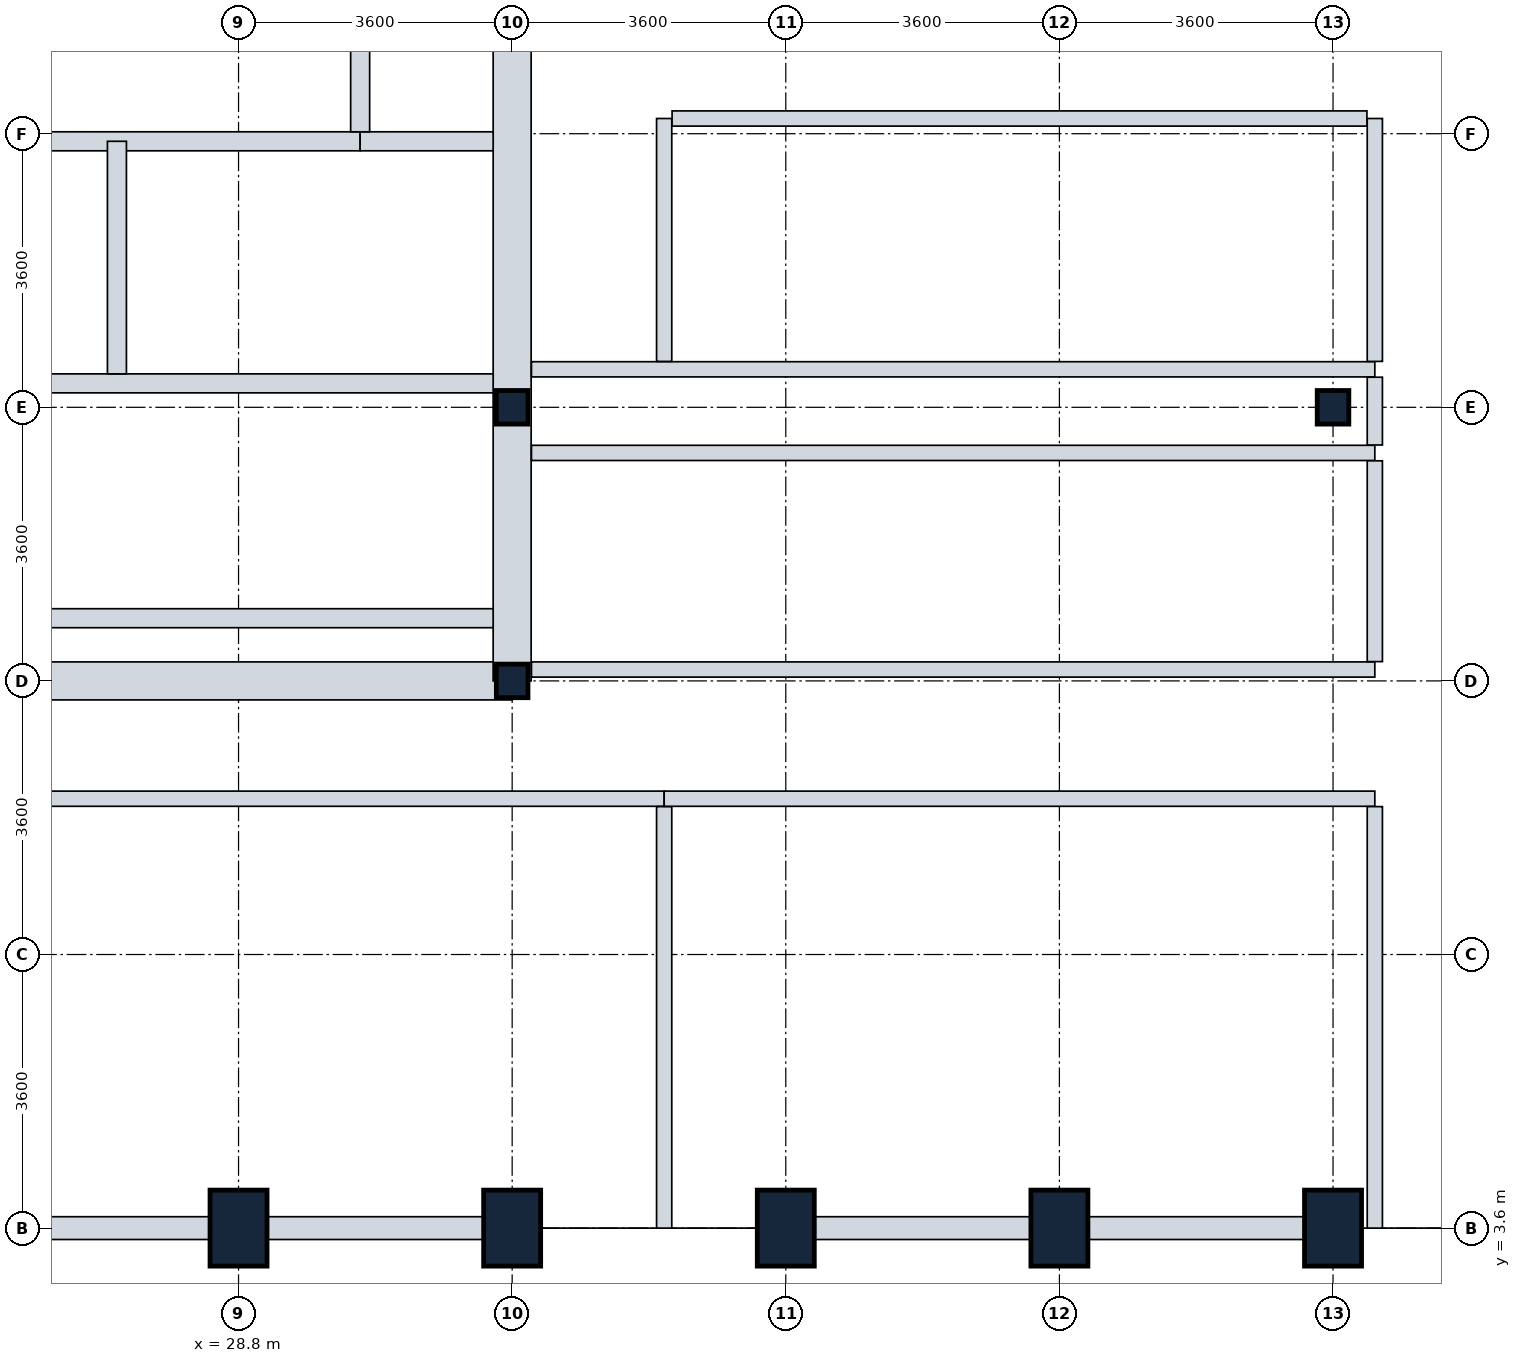
"""IFC4 building model, lengths in metres.
Left out: names, types, materials, properties, quantities, classifications, styles, units other than length and angle.
Written with IfcOpenShell. Run it as: python <this file> out.ifc"""

import sys

from ifc_helpers import new_model, si_unit, direction, frame, frame_2d, origin, origin_2d, place, context, subcontext, project, spatial, rectangle, i_section, extrude, element, fill, save


model = new_model("IFC4")
c1 = context("Model", 3, precision=1e-05, world=origin(), true_north=direction((0.0, 1.0)))
c2 = subcontext(c1, "Body", "Model", "MODEL_VIEW")
j1 = project(units=[si_unit("LENGTHUNIT", "METRE"), si_unit("PLANEANGLEUNIT", "RADIAN")], contexts=[c1])
p1 = place(None, origin())
s1 = spatial("IfcSite", under=j1, at=p1, CompositionType="ELEMENT")
p2 = place(p1, origin())
s2 = spatial("IfcBuilding", under=s1, at=p2, CompositionType="ELEMENT")
p3 = place(p2, frame((0.0, 0.0, 169.4)))
s3 = spatial("IfcBuildingStorey", under=s2, at=p3, CompositionType="ELEMENT", Elevation=169.4)
for number, where, z_axis, x_axis in (
    (1, (28.8, 3.6, 0.0), (0.0, 0.0, 1.0), (1.0, 0.0, 0.0)),
    (2, (32.4, 3.6, 0.0), (0.0, 0.0, 1.0), (1.0, 0.0, 0.0)),
):
    element("IfcColumn", number, at=place(p3, frame(where, z_axis=z_axis, x_axis=x_axis)), inside=s3, PredefinedType="COLUMN", context=c2, shape_type="SweptSolid", body=[
        extrude(rectangle(XDim=0.75, YDim=1.0, at=origin_2d()), origin(), (0.0, 0.0, 1.0), 5.4),
    ])
for number, where, z_axis, x_axis in (
    (3, (32.4, 10.8, 0.0), (0.0, 0.0, 1.0), (1.0, 0.0, 0.0)),
    (4, (32.4, 14.4, 0.0), (0.0, 0.0, 1.0), (1.0, 0.0, 0.0)),
):
    element("IfcColumn", number, at=place(p3, frame(where, z_axis=z_axis, x_axis=x_axis)), inside=s3, PredefinedType="COLUMN", context=c2, shape_type="SweptSolid", body=[
        extrude(i_section(OverallWidth=0.416, OverallDepth=0.442, WebThickness=0.025, FlangeThickness=0.041, FilletRadius=0.015, at=origin_2d()), origin(), (0.0, 0.0, 1.0), 5.4),
    ])
for number, where, z_axis, x_axis in (
    (5, (36.0, 3.6, 0.0), (0.0, 0.0, 1.0), (1.0, 0.0, 0.0)),
    (6, (39.6, 3.6, 0.0), (0.0, 0.0, 1.0), (1.0, 0.0, 0.0)),
    (7, (43.2, 3.6, 0.0), (0.0, 0.0, 1.0), (1.0, 0.0, 0.0)),
):
    element("IfcColumn", number, at=place(p3, frame(where, z_axis=z_axis, x_axis=x_axis)), inside=s3, PredefinedType="COLUMN", context=c2, shape_type="SweptSolid", body=[
        extrude(rectangle(XDim=0.75, YDim=1.0, at=origin_2d()), origin(), (0.0, 0.0, 1.0), 5.4),
    ])
p4 = place(p3, frame((43.2, 14.4, 0.0), z_axis=(0.0, 0.0, 1.0), x_axis=(1.0, 0.0, 0.0)))
e8 = element("IfcColumn", 8, at=p4, inside=s3, PredefinedType="COLUMN", context=c2, shape_type="SweptSolid", body=[
    extrude(i_section(OverallWidth=0.416, OverallDepth=0.442, WebThickness=0.025, FlangeThickness=0.041, FilletRadius=0.015, at=origin_2d()), origin(), (0.0, 0.0, 1.0), 5.4),
])
p5 = place(p3, frame((28.8, 3.6, 0.0), z_axis=(0.0, 0.0, 1.0), x_axis=(-1.0, 0.0, 0.0)))
e9 = element("IfcWall", 9, at=p5, inside=s3, PredefinedType="STANDARD", context=c2, shape_type="SweptSolid", body=[
    extrude(rectangle(XDim=3.6, YDim=0.3, at=frame_2d((1.8, 0.0))), origin(), (0.0, 0.0, 1.0), 4.53),
])
p6 = place(p3, frame((32.4, 3.6, 0.0), z_axis=(0.0, 0.0, 1.0), x_axis=(-1.0, 0.0, 0.0)))
e10 = element("IfcWall", 10, at=p6, inside=s3, PredefinedType="STANDARD", context=c2, shape_type="SweptSolid", body=[
    extrude(rectangle(XDim=3.6, YDim=0.3, at=frame_2d((1.8, 0.0))), origin(), (0.0, 0.0, 1.0), 4.53),
])
p7 = place(p3, frame((39.6, 3.6, 0.0), z_axis=(0.0, 0.0, 1.0), x_axis=(-1.0, 0.0, 0.0)))
e11 = element("IfcWall", 11, at=p7, inside=s3, PredefinedType="STANDARD", context=c2, shape_type="SweptSolid", body=[
    extrude(rectangle(XDim=3.6, YDim=0.3, at=frame_2d((1.8, 0.0))), origin(), (0.0, 0.0, 1.0), 4.53),
])
p8 = place(p3, frame((43.2, 3.6, 0.0), z_axis=(0.0, 0.0, 1.0), x_axis=(-1.0, 0.0, 0.0)))
e12 = element("IfcWall", 12, at=p8, inside=s3, PredefinedType="STANDARD", context=c2, shape_type="SweptSolid", body=[
    extrude(rectangle(XDim=3.6, YDim=0.3, at=frame_2d((1.8, 0.0))), origin(), (0.0, 0.0, 1.0), 4.53),
])
p9 = place(p3, frame((14.4, 10.8, 0.0), z_axis=(0.0, 0.0, 1.0), x_axis=(1.0, 0.0, 0.0)))
e13 = element("IfcWall", 13, at=p9, inside=s3, PredefinedType="SHEAR", context=c2, shape_type="SweptSolid", body=[
    extrude(rectangle(XDim=18.0, YDim=0.5, at=frame_2d((9.0, 0.0))), origin(), (0.0, 0.0, 1.0), 5.08),
])
p10 = place(p3, frame((32.4, 10.8, 0.0), z_axis=(0.0, 0.0, 1.0), x_axis=(0.0, 1.0, 0.0)))
e14 = element("IfcWall", 14, at=p10, inside=s3, PredefinedType="SHEAR", context=c2, shape_type="SweptSolid", body=[
    extrude(rectangle(XDim=14.4, YDim=0.5, at=frame_2d((7.2, 0.0))), origin(), (0.0, 0.0, 1.0), 5.08),
])
p11 = place(p10, frame((4.35, 0.0, 0.0)))
e15 = element("IfcOpeningElement", 15, at=p11, cuts=e14, PredefinedType="OPENING", context=c2, shape_type="SweptSolid", body=[
    extrude(rectangle(XDim=1.2, YDim=2.1, at=frame_2d((0.6, 1.05))), frame((0.0, 0.26, 0.0), z_axis=(0.0, -1.0, 0.0), x_axis=(1.0, 0.0, 0.0)), (0.0, 0.0, 1.0), 0.52),
])
p12 = place(p10, frame((10.0, 0.0, 0.0)))
e16 = element("IfcOpeningElement", 16, at=p12, cuts=e14, PredefinedType="OPENING", context=c2, shape_type="SweptSolid", body=[
    extrude(rectangle(XDim=1.2, YDim=2.1, at=frame_2d((0.6, 1.05))), frame((0.0, 0.26, 0.0), z_axis=(0.0, -1.0, 0.0), x_axis=(1.0, 0.0, 0.0)), (0.0, 0.0, 1.0), 0.52),
])
p13 = place(p3, frame((23.35, 11.625, 0.0), z_axis=(0.0, 0.0, 1.0), x_axis=(1.0, 0.0, 0.0)))
e17 = element("IfcWall", 17, at=p13, inside=s3, PredefinedType="SHEAR", context=c2, shape_type="SweptSolid", body=[
    extrude(rectangle(XDim=8.8, YDim=0.25, at=frame_2d((4.4, 0.0))), origin(), (0.0, 0.0, 1.0), 5.08),
])
p14 = place(p3, frame((23.35, 14.715, 0.0), z_axis=(0.0, 0.0, 1.0), x_axis=(1.0, 0.0, 0.0)))
e18 = element("IfcWall", 18, at=p14, inside=s3, PredefinedType="SHEAR", context=c2, shape_type="SweptSolid", body=[
    extrude(rectangle(XDim=8.8, YDim=0.25, at=frame_2d((4.4, 0.0))), origin(), (0.0, 0.0, 1.0), 5.08),
])
p15 = place(p14, frame((6.775, 0.0, 0.0)))
e19 = element("IfcOpeningElement", 19, at=p15, cuts=e18, PredefinedType="OPENING", context=c2, shape_type="SweptSolid", body=[
    extrude(rectangle(XDim=1.1, YDim=2.1, at=frame_2d((0.55, 1.05))), frame((0.0, 0.135, 0.0), z_axis=(0.0, -1.0, 0.0), x_axis=(1.0, 0.0, 0.0)), (0.0, 0.0, 1.0), 0.27),
])
p16 = place(p3, frame((21.88, 17.9, 0.0), z_axis=(0.0, 0.0, 1.0), x_axis=(1.0, 0.0, 0.0)))
e20 = element("IfcWall", 20, at=p16, inside=s3, PredefinedType="PARTITIONING", context=c2, shape_type="SweptSolid", body=[
    extrude(rectangle(XDim=8.52, YDim=0.25, at=frame_2d((4.26, 0.0))), origin(), (0.0, 0.0, 1.0), 5.065),
])
p17 = place(p3, frame((30.4, 17.9, 0.0), z_axis=(0.0, 0.0, 1.0), x_axis=(1.0, 0.0, 0.0)))
e21 = element("IfcWall", 21, at=p17, inside=s3, PredefinedType="PARTITIONING", context=c2, shape_type="SweptSolid", body=[
    extrude(rectangle(XDim=1.75, YDim=0.25, at=frame_2d((0.875, 0.0))), origin(), (0.0, 0.0, 1.0), 5.065),
])
p18 = place(p17, frame((0.32, 0.0, 0.0)))
e22 = element("IfcOpeningElement", 22, at=p18, cuts=e21, PredefinedType="OPENING", context=c2, shape_type="SweptSolid", body=[
    extrude(rectangle(XDim=1.1, YDim=2.1, at=frame_2d((0.55, 1.05))), frame((0.0, 0.135, 0.0), z_axis=(0.0, -1.0, 0.0), x_axis=(1.0, 0.0, 0.0)), (0.0, 0.0, 1.0), 0.27),
])
p19 = place(p3, frame((27.2, 14.84, 0.0), z_axis=(0.0, 0.0, 1.0), x_axis=(0.0, 1.0, 0.0)))
e23 = element("IfcWall", 23, at=p19, inside=s3, PredefinedType="PARTITIONING", context=c2, shape_type="SweptSolid", body=[
    extrude(rectangle(XDim=3.06, YDim=0.25, at=frame_2d((1.53, 0.0))), origin(), (0.0, 0.0, 1.0), 5.065),
])
p20 = place(p19, frame((0.98, 0.0, 0.0)))
e24 = element("IfcOpeningElement", 24, at=p20, cuts=e23, PredefinedType="OPENING", context=c2, shape_type="SweptSolid", body=[
    extrude(rectangle(XDim=1.1, YDim=2.1, at=frame_2d((0.55, 1.05))), frame((0.0, 0.135, 0.0), z_axis=(0.0, -1.0, 0.0), x_axis=(1.0, 0.0, 0.0)), (0.0, 0.0, 1.0), 0.27),
])
p21 = place(p3, frame((30.4, 18.025, 0.0), z_axis=(0.0, 0.0, 1.0), x_axis=(0.0, 1.0, 0.0)))
e25 = element("IfcWall", 25, at=p21, inside=s3, PredefinedType="PARTITIONING", context=c2, shape_type="SweptSolid", body=[
    extrude(rectangle(XDim=2.27, YDim=0.25, at=frame_2d((1.135, 0.0))), origin(), (0.0, 0.0, 1.0), 5.065),
])
for number, where, z_axis, x_axis in (
    (26, (32.654, 13.8, 0.0), (0.0, 0.0, 1.0), (1.0, 0.0, 0.0)),
    (27, (32.654, 14.9, 0.0), (0.0, 0.0, 1.0), (1.0, 0.0, 0.0)),
):
    element("IfcWall", number, at=place(p3, frame(where, z_axis=z_axis, x_axis=x_axis)), inside=s3, PredefinedType="PARTITIONING", context=c2, shape_type="SweptSolid", body=[
        extrude(rectangle(XDim=11.096, YDim=0.2, at=frame_2d((5.548, 0.0))), origin(), (0.0, 0.0, 1.0), 3.58),
    ])
p22 = place(p3, frame((43.75, 13.904, 0.0), z_axis=(0.0, 0.0, 1.0), x_axis=(0.0, 1.0, 0.0)))
e28 = element("IfcWall", 28, at=p22, inside=s3, PredefinedType="PARTITIONING", context=c2, shape_type="SweptSolid", body=[
    extrude(rectangle(XDim=0.892, YDim=0.2, at=frame_2d((0.446, 0.0))), origin(), (0.0, 0.0, 1.0), 3.58),
])
p23 = place(p3, frame((13.03, 9.25, 0.0), z_axis=(0.0, 0.0, 1.0), x_axis=(1.0, 0.0, 0.0)))
e29 = element("IfcWall", 29, at=p23, inside=s3, PredefinedType="PARTITIONING", context=c2, shape_type="SweptSolid", body=[
    extrude(rectangle(XDim=21.37, YDim=0.2, at=frame_2d((10.685, 0.0))), origin(), (0.0, 0.0, 1.0), 4.7),
])
p24 = place(p23, frame((11.248, 0.0, 0.0)))
e30 = element("IfcOpeningElement", 30, at=p24, cuts=e29, PredefinedType="OPENING", context=c2, shape_type="SweptSolid", body=[
    extrude(rectangle(XDim=1.2, YDim=2.1, at=frame_2d((0.6, 1.05))), frame((0.0, 0.11, 0.0), z_axis=(0.0, -1.0, 0.0), x_axis=(1.0, 0.0, 0.0)), (0.0, 0.0, 1.0), 0.22),
])
p25 = place(p3, frame((34.4, 3.6, 0.0), z_axis=(0.0, 0.0, 1.0), x_axis=(0.0, 1.0, 0.0)))
e31 = element("IfcWall", 31, at=p25, inside=s3, PredefinedType="PARTITIONING", context=c2, shape_type="SweptSolid", body=[
    extrude(rectangle(XDim=5.546, YDim=0.2, at=frame_2d((2.773, 0.0))), origin(), (0.0, 0.0, 1.0), 4.53),
])
p26 = place(p3, frame((34.4, 9.25, 0.0), z_axis=(0.0, 0.0, 1.0), x_axis=(1.0, 0.0, 0.0)))
e32 = element("IfcWall", 32, at=p26, inside=s3, PredefinedType="PARTITIONING", context=c2, shape_type="SweptSolid", body=[
    extrude(rectangle(XDim=9.35, YDim=0.2, at=frame_2d((4.675, 0.0))), origin(), (0.0, 0.0, 1.0), 4.7),
])
p27 = place(p26, frame((3.735, 0.0, 0.0)))
e33 = element("IfcOpeningElement", 33, at=p27, cuts=e32, PredefinedType="OPENING", context=c2, shape_type="SweptSolid", body=[
    extrude(rectangle(XDim=1.8, YDim=2.2, at=frame_2d((0.9, 1.1))), frame((0.0, 0.11, 0.0), z_axis=(0.0, -1.0, 0.0), x_axis=(1.0, 0.0, 0.0)), (0.0, 0.0, 1.0), 0.22),
])
p28 = place(p3, frame((43.75, 3.6, 0.0), z_axis=(0.0, 0.0, 1.0), x_axis=(0.0, 1.0, 0.0)))
e34 = element("IfcWall", 34, at=p28, inside=s3, PredefinedType="PARTITIONING", context=c2, shape_type="SweptSolid", body=[
    extrude(rectangle(XDim=5.546, YDim=0.2, at=frame_2d((2.773, 0.0))), origin(), (0.0, 0.0, 1.0), 4.53),
])
for number, where, z_axis, x_axis in (
    (35, (34.4, 15.004, 0.0), (0.0, 0.0, 1.0), (0.0, 1.0, 0.0)),
    (36, (43.75, 15.004, 0.0), (0.0, 0.0, 1.0), (0.0, 1.0, 0.0)),
):
    element("IfcWall", number, at=place(p3, frame(where, z_axis=z_axis, x_axis=x_axis)), inside=s3, PredefinedType="PARTITIONING", context=c2, shape_type="SweptSolid", body=[
        extrude(rectangle(XDim=3.196, YDim=0.2, at=frame_2d((1.598, 0.0))), origin(), (0.0, 0.0, 1.0), 3.58),
    ])
p29 = place(p3, frame((34.504, 18.2, 0.0), z_axis=(0.0, 0.0, 1.0), x_axis=(1.0, 0.0, 0.0)))
e37 = element("IfcWall", 37, at=p29, inside=s3, PredefinedType="PARTITIONING", context=c2, shape_type="SweptSolid", body=[
    extrude(rectangle(XDim=9.142, YDim=0.2, at=frame_2d((4.571, 0.0))), origin(), (0.0, 0.0, 1.0), 4.7),
])
p30 = place(p29, frame((4.031, 0.0, 0.0)))
e38 = element("IfcOpeningElement", 38, at=p30, cuts=e37, PredefinedType="OPENING", context=c2, shape_type="SweptSolid", body=[
    extrude(rectangle(XDim=1.0, YDim=2.1, at=frame_2d((0.5, 1.05))), frame((0.0, 0.11, 0.0), z_axis=(0.0, -1.0, 0.0), x_axis=(1.0, 0.0, 0.0)), (0.0, 0.0, 1.0), 0.22),
])
p31 = place(p3, frame((32.654, 10.95, 0.0), z_axis=(0.0, 0.0, 1.0), x_axis=(1.0, 0.0, 0.0)))
e39 = element("IfcWall", 39, at=p31, inside=s3, PredefinedType="PARTITIONING", context=c2, shape_type="SweptSolid", body=[
    extrude(rectangle(XDim=11.096, YDim=0.2, at=frame_2d((5.548, 0.0))), origin(), (0.0, 0.0, 1.0), 4.7),
])
p32 = place(p31, frame((4.921, 0.0, 0.0)))
e40 = element("IfcOpeningElement", 40, at=p32, cuts=e39, PredefinedType="OPENING", context=c2, shape_type="SweptSolid", body=[
    extrude(rectangle(XDim=1.0, YDim=2.1, at=frame_2d((0.5, 1.05))), frame((0.0, 0.11, 0.0), z_axis=(0.0, -1.0, 0.0), x_axis=(1.0, 0.0, 0.0)), (0.0, 0.0, 1.0), 0.22),
])
p33 = place(p3, frame((43.75, 11.054, 0.0), z_axis=(0.0, 0.0, 1.0), x_axis=(0.0, 1.0, 0.0)))
e41 = element("IfcWall", 41, at=p33, inside=s3, PredefinedType="PARTITIONING", context=c2, shape_type="SweptSolid", body=[
    extrude(rectangle(XDim=2.642, YDim=0.2, at=frame_2d((1.321, 0.0))), origin(), (0.0, 0.0, 1.0), 5.065),
])
p34 = place(p15, origin())
e42 = element("IfcDoor", 42, at=p34, inside=s3, OperationType="SINGLE_SWING_LEFT", PredefinedType="DOOR", context=c2, shape_type="SweptSolid", body=[
    extrude(rectangle(XDim=1.1, YDim=2.1, at=frame_2d((0.55, 1.05))), frame((0.0, 0.025, 0.0), z_axis=(0.0, -1.0, 0.0), x_axis=(1.0, 0.0, 0.0)), (0.0, 0.0, 1.0), 0.05),
])
fill(e19, e42)
p35 = place(p20, origin())
e43 = element("IfcDoor", 43, at=p35, inside=s3, OperationType="SLIDING_TO_LEFT", PredefinedType="DOOR", context=c2, shape_type="SweptSolid", body=[
    extrude(rectangle(XDim=1.1, YDim=2.1, at=frame_2d((0.55, 1.05))), frame((0.0, 0.025, 0.0), z_axis=(0.0, -1.0, 0.0), x_axis=(1.0, 0.0, 0.0)), (0.0, 0.0, 1.0), 0.05),
])
fill(e24, e43)
p36 = place(p11, origin())
e44 = element("IfcDoor", 44, at=p36, inside=s3, OperationType="SINGLE_SWING_LEFT", PredefinedType="DOOR", context=c2, shape_type="SweptSolid", body=[
    extrude(rectangle(XDim=1.2, YDim=2.1, at=frame_2d((0.6, 1.05))), frame((0.0, 0.025, 0.0), z_axis=(0.0, -1.0, 0.0), x_axis=(1.0, 0.0, 0.0)), (0.0, 0.0, 1.0), 0.05),
])
fill(e15, e44)
p37 = place(p18, origin())
e45 = element("IfcDoor", 45, at=p37, inside=s3, OperationType="SINGLE_SWING_LEFT", PredefinedType="DOOR", context=c2, shape_type="SweptSolid", body=[
    extrude(rectangle(XDim=1.1, YDim=2.1, at=frame_2d((0.55, 1.05))), frame((0.0, 0.025, 0.0), z_axis=(0.0, -1.0, 0.0), x_axis=(1.0, 0.0, 0.0)), (0.0, 0.0, 1.0), 0.05),
])
fill(e22, e45)
p38 = place(p27, origin())
e46 = element("IfcDoor", 46, at=p38, inside=s3, OperationType="DOUBLE_DOOR_SINGLE_SWING", PredefinedType="DOOR", context=c2, shape_type="SweptSolid", body=[
    extrude(rectangle(XDim=1.8, YDim=2.2, at=frame_2d((0.9, 1.1))), frame((0.0, 0.025, 0.0), z_axis=(0.0, -1.0, 0.0), x_axis=(1.0, 0.0, 0.0)), (0.0, 0.0, 1.0), 0.05),
])
fill(e33, e46)
p39 = place(p30, origin())
e47 = element("IfcDoor", 47, at=p39, inside=s3, OperationType="SINGLE_SWING_LEFT", PredefinedType="DOOR", context=c2, shape_type="SweptSolid", body=[
    extrude(rectangle(XDim=1.0, YDim=2.1, at=frame_2d((0.5, 1.05))), frame((0.0, 0.025, 0.0), z_axis=(0.0, -1.0, 0.0), x_axis=(1.0, 0.0, 0.0)), (0.0, 0.0, 1.0), 0.05),
])
fill(e38, e47)
p40 = place(p32, origin())
e48 = element("IfcDoor", 48, at=p40, inside=s3, OperationType="SINGLE_SWING_LEFT", PredefinedType="DOOR", context=c2, shape_type="SweptSolid", body=[
    extrude(rectangle(XDim=1.0, YDim=2.1, at=frame_2d((0.5, 1.05))), frame((0.0, 0.025, 0.0), z_axis=(0.0, -1.0, 0.0), x_axis=(1.0, 0.0, 0.0)), (0.0, 0.0, 1.0), 0.05),
])
fill(e40, e48)
save(model, sys.argv[1])
